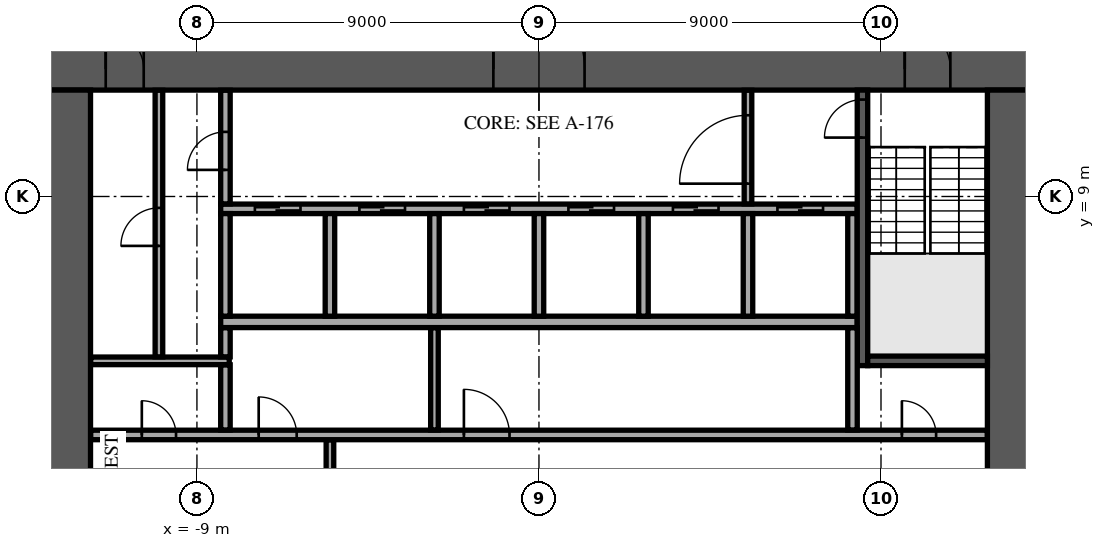
"""IFC4 building model, lengths in metres.
Left out: names, types, materials, properties, quantities, classifications, styles, units other than length and angle.
Written with IfcOpenShell. Run it as: python <this file> out.ifc"""

import sys

from ifc_helpers import new_model, si_unit, direction, frame, frame_2d, origin, place, context, subcontext, project, spatial, rectangle, extrude, element, fill, save


model = new_model("IFC4")
c1 = context("Model", 3, precision=1e-05, world=origin(), true_north=direction((0.0, 1.0)))
c2 = subcontext(c1, "Body", "Model", "MODEL_VIEW")
j1 = project(units=[si_unit("LENGTHUNIT", "METRE"), si_unit("PLANEANGLEUNIT", "RADIAN")], contexts=[c1])
p1 = place(None, origin())
s1 = spatial("IfcSite", under=j1, at=p1, CompositionType="ELEMENT")
p2 = place(p1, origin())
s2 = spatial("IfcBuilding", under=s1, at=p2, CompositionType="ELEMENT")
p3 = place(p2, frame((0.0, 0.0, 86.1)))
s3 = spatial("IfcBuildingStorey", under=s2, at=p3, CompositionType="ELEMENT", Elevation=86.1)
p4 = place(p3, frame((-12.9, 12.35, 0.0), z_axis=(0.0, 0.0, 1.0), x_axis=(1.0, 0.0, 0.0)))
e1 = element("IfcWall", 1, at=p4, inside=s3, PredefinedType="SHEAR", context=c2, shape_type="SweptSolid", body=[
    extrude(rectangle(XDim=25.8, YDim=1.1, at=frame_2d((12.9, 0.0))), origin(), (0.0, 0.0, 1.0), 3.58),
])
p5 = place(p4, frame((11.7, 0.0, 0.0)))
e2 = element("IfcOpeningElement", 2, at=p5, cuts=e1, PredefinedType="OPENING", context=c2, shape_type="SweptSolid", body=[
    extrude(rectangle(XDim=2.4, YDim=2.4, at=frame_2d((1.2, 1.2))), frame((0.0, 0.56, 0.0), z_axis=(0.0, -1.0, 0.0), x_axis=(1.0, 0.0, 0.0)), (0.0, 0.0, 1.0), 1.12),
])
p6 = place(p4, frame((22.525, 0.0, 0.0)))
e3 = element("IfcOpeningElement", 3, at=p6, cuts=e1, PredefinedType="OPENING", context=c2, shape_type="SweptSolid", body=[
    extrude(rectangle(XDim=1.2, YDim=2.1, at=frame_2d((0.6, 1.05))), frame((0.0, 0.56, 0.0), z_axis=(0.0, -1.0, 0.0), x_axis=(1.0, 0.0, 0.0)), (0.0, 0.0, 1.0), 1.12),
])
p7 = place(p4, frame((1.5, 0.0, 0.0)))
e4 = element("IfcOpeningElement", 4, at=p7, cuts=e1, PredefinedType="OPENING", context=c2, shape_type="SweptSolid", body=[
    extrude(rectangle(XDim=1.0, YDim=2.1, at=frame_2d((0.5, 1.05))), frame((0.0, 0.56, 0.0), z_axis=(0.0, -1.0, 0.0), x_axis=(1.0, 0.0, 0.0)), (0.0, 0.0, 1.0), 1.12),
])
p8 = place(p3, frame((12.35, -11.8, 0.0), z_axis=(0.0, 0.0, 1.0), x_axis=(0.0, 1.0, 0.0)))
e5 = element("IfcWall", 5, at=p8, inside=s3, PredefinedType="SHEAR", context=c2, shape_type="SweptSolid", body=[
    extrude(rectangle(XDim=23.6, YDim=1.1, at=frame_2d((11.8, 0.0))), origin(), (0.0, 0.0, 1.0), 3.58),
])
p9 = place(p8, frame((10.6, 0.0, 0.0)))
e6 = element("IfcOpeningElement", 6, at=p9, cuts=e5, PredefinedType="OPENING", context=c2, shape_type="SweptSolid", body=[
    extrude(rectangle(XDim=2.4, YDim=2.4, at=frame_2d((1.2, 1.2))), frame((0.0, 0.56, 0.0), z_axis=(0.0, -1.0, 0.0), x_axis=(1.0, 0.0, 0.0)), (0.0, 0.0, 1.0), 1.12),
])
p10 = place(p3, frame((-12.35, -11.8, 0.0), z_axis=(0.0, 0.0, 1.0), x_axis=(0.0, 1.0, 0.0)))
e7 = element("IfcWall", 7, at=p10, inside=s3, PredefinedType="SHEAR", context=c2, shape_type="SweptSolid", body=[
    extrude(rectangle(XDim=23.6, YDim=1.1, at=frame_2d((11.8, 0.0))), origin(), (0.0, 0.0, 1.0), 3.58),
])
p11 = place(p10, frame((10.6, 0.0, 0.0)))
e8 = element("IfcOpeningElement", 8, at=p11, cuts=e7, PredefinedType="OPENING", context=c2, shape_type="SweptSolid", body=[
    extrude(rectangle(XDim=2.4, YDim=2.4, at=frame_2d((1.2, 1.2))), frame((0.0, 0.56, 0.0), z_axis=(0.0, -1.0, 0.0), x_axis=(1.0, 0.0, 0.0)), (0.0, 0.0, 1.0), 1.12),
])
p12 = place(p3, frame((-8.375, 5.7, 0.0), z_axis=(0.0, 0.0, 1.0), x_axis=(1.0, 0.0, 0.0)))
e9 = element("IfcWall", 9, at=p12, inside=s3, PredefinedType="SOLIDWALL", context=c2, shape_type="SweptSolid", body=[
    extrude(rectangle(XDim=16.75, YDim=0.3, at=frame_2d((8.375, 0.0))), origin(), (0.0, 0.0, 1.0), 3.58),
])
p13 = place(p3, frame((-8.375, 8.675, 0.0), z_axis=(0.0, 0.0, 1.0), x_axis=(1.0, 0.0, 0.0)))
e10 = element("IfcWall", 10, at=p13, inside=s3, PredefinedType="SOLIDWALL", context=c2, shape_type="SweptSolid", body=[
    extrude(rectangle(XDim=16.75, YDim=0.25, at=frame_2d((8.375, 0.0))), origin(), (0.0, 0.0, 1.0), 3.58),
])
p14 = place(p13, frame((0.9, 0.0, 0.0)))
e11 = element("IfcOpeningElement", 11, at=p14, cuts=e10, PredefinedType="OPENING", context=c2, shape_type="SweptSolid", body=[
    extrude(rectangle(XDim=1.2, YDim=2.1, at=frame_2d((0.6, 1.05))), frame((0.0, 0.135, 0.0), z_axis=(0.0, -1.0, 0.0), x_axis=(1.0, 0.0, 0.0)), (0.0, 0.0, 1.0), 0.27),
])
p15 = place(p13, frame((3.65, 0.0, 0.0)))
e12 = element("IfcOpeningElement", 12, at=p15, cuts=e10, PredefinedType="OPENING", context=c2, shape_type="SweptSolid", body=[
    extrude(rectangle(XDim=1.2, YDim=2.1, at=frame_2d((0.6, 1.05))), frame((0.0, 0.135, 0.0), z_axis=(0.0, -1.0, 0.0), x_axis=(1.0, 0.0, 0.0)), (0.0, 0.0, 1.0), 0.27),
])
p16 = place(p13, frame((6.4, 0.0, 0.0)))
e13 = element("IfcOpeningElement", 13, at=p16, cuts=e10, PredefinedType="OPENING", context=c2, shape_type="SweptSolid", body=[
    extrude(rectangle(XDim=1.2, YDim=2.1, at=frame_2d((0.6, 1.05))), frame((0.0, 0.135, 0.0), z_axis=(0.0, -1.0, 0.0), x_axis=(1.0, 0.0, 0.0)), (0.0, 0.0, 1.0), 0.27),
])
p17 = place(p13, frame((9.15, 0.0, 0.0)))
e14 = element("IfcOpeningElement", 14, at=p17, cuts=e10, PredefinedType="OPENING", context=c2, shape_type="SweptSolid", body=[
    extrude(rectangle(XDim=1.2, YDim=2.1, at=frame_2d((0.6, 1.05))), frame((0.0, 0.135, 0.0), z_axis=(0.0, -1.0, 0.0), x_axis=(1.0, 0.0, 0.0)), (0.0, 0.0, 1.0), 0.27),
])
p18 = place(p13, frame((11.9, 0.0, 0.0)))
e15 = element("IfcOpeningElement", 15, at=p18, cuts=e10, PredefinedType="OPENING", context=c2, shape_type="SweptSolid", body=[
    extrude(rectangle(XDim=1.2, YDim=2.1, at=frame_2d((0.6, 1.05))), frame((0.0, 0.135, 0.0), z_axis=(0.0, -1.0, 0.0), x_axis=(1.0, 0.0, 0.0)), (0.0, 0.0, 1.0), 0.27),
])
p19 = place(p13, frame((14.65, 0.0, 0.0)))
e16 = element("IfcOpeningElement", 16, at=p19, cuts=e10, PredefinedType="OPENING", context=c2, shape_type="SweptSolid", body=[
    extrude(rectangle(XDim=1.2, YDim=2.1, at=frame_2d((0.6, 1.05))), frame((0.0, 0.135, 0.0), z_axis=(0.0, -1.0, 0.0), x_axis=(1.0, 0.0, 0.0)), (0.0, 0.0, 1.0), 0.27),
])
for number, where, z_axis, x_axis in (
    (17, (-8.25, 5.85, 0.0), (0.0, 0.0, 1.0), (0.0, 1.0, 0.0)),
    (18, (-5.5, 5.85, 0.0), (0.0, 0.0, 1.0), (0.0, 1.0, 0.0)),
    (19, (-2.75, 5.85, 0.0), (0.0, 0.0, 1.0), (0.0, 1.0, 0.0)),
    (20, (0.0, 5.85, 0.0), (0.0, 0.0, 1.0), (0.0, 1.0, 0.0)),
    (21, (2.75, 5.85, 0.0), (0.0, 0.0, 1.0), (0.0, 1.0, 0.0)),
    (22, (5.5, 5.85, 0.0), (0.0, 0.0, 1.0), (0.0, 1.0, 0.0)),
    (23, (8.25, 5.85, 0.0), (0.0, 0.0, 1.0), (0.0, 1.0, 0.0)),
):
    element("IfcWall", number, at=place(p3, frame(where, z_axis=z_axis, x_axis=x_axis)), inside=s3, PredefinedType="SOLIDWALL", context=c2, shape_type="SweptSolid", body=[
        extrude(rectangle(XDim=2.7, YDim=0.25, at=frame_2d((1.35, 0.0))), origin(), (0.0, 0.0, 1.0), 3.58),
    ])
p20 = place(p3, frame((8.512, 4.55, 0.0), z_axis=(0.0, 0.0, 1.0), x_axis=(0.0, 1.0, 0.0)))
e24 = element("IfcWall", 24, at=p20, inside=s3, PredefinedType="SOLIDWALL", context=c2, shape_type="SweptSolid", body=[
    extrude(rectangle(XDim=7.25, YDim=0.275, at=frame_2d((3.625, 0.0))), origin(), (0.0, 0.0, 1.0), 3.58),
])
p21 = place(p20, frame((6.0, 0.0, 0.0)))
e25 = element("IfcOpeningElement", 25, at=p21, cuts=e24, PredefinedType="OPENING", context=c2, shape_type="SweptSolid", body=[
    extrude(rectangle(XDim=1.0, YDim=2.1, at=frame_2d((0.5, 1.05))), frame((0.0, 0.147, 0.0), z_axis=(0.0, -1.0, 0.0), x_axis=(1.0, 0.0, 0.0)), (0.0, 0.0, 1.0), 0.295),
])
p22 = place(p3, frame((8.65, 4.675, 0.0), z_axis=(0.0, 0.0, 1.0), x_axis=(1.0, 0.0, 0.0)))
e26 = element("IfcWall", 26, at=p22, inside=s3, PredefinedType="SOLIDWALL", context=c2, shape_type="SweptSolid", body=[
    extrude(rectangle(XDim=3.15, YDim=0.25, at=frame_2d((1.575, 0.0))), origin(), (0.0, 0.0, 1.0), 3.58),
])
p23 = place(p3, frame((-5.5, -2.595, 0.0), z_axis=(0.0, 0.0, 1.0), x_axis=(0.0, 1.0, 0.0)))
e27 = element("IfcWall", 27, at=p23, inside=s3, PredefinedType="PARTITIONING", context=c2, shape_type="SweptSolid", body=[
    extrude(rectangle(XDim=5.19, YDim=0.2, at=frame_2d((2.595, 0.0))), origin(), (0.0, 0.0, 1.0), 3.58),
])
p24 = place(p23, frame((1.395, 0.0, 0.0)))
e28 = element("IfcOpeningElement", 28, at=p24, cuts=e27, PredefinedType="OPENING", context=c2, shape_type="SweptSolid", body=[
    extrude(rectangle(XDim=2.4, YDim=2.4, at=frame_2d((1.2, 1.2))), frame((0.0, 0.11, 0.0), z_axis=(0.0, -1.0, 0.0), x_axis=(1.0, 0.0, 0.0)), (0.0, 0.0, 1.0), 0.22),
])
p25 = place(p3, frame((-11.795, 2.725, 0.0), z_axis=(0.0, 0.0, 1.0), x_axis=(1.0, 0.0, 0.0)))
e29 = element("IfcWall", 29, at=p25, inside=s3, PredefinedType="PARTITIONING", context=c2, shape_type="SweptSolid", body=[
    extrude(rectangle(XDim=23.59, YDim=0.25, at=frame_2d((11.795, 0.0))), origin(), (0.0, 0.0, 1.0), 3.58),
])
p26 = place(p25, frame((21.345, 0.0, 0.0)))
e30 = element("IfcOpeningElement", 30, at=p26, cuts=e29, PredefinedType="OPENING", context=c2, shape_type="SweptSolid", body=[
    extrude(rectangle(XDim=0.9, YDim=2.1, at=frame_2d((0.45, 1.05))), frame((0.0, 0.135, 0.0), z_axis=(0.0, -1.0, 0.0), x_axis=(1.0, 0.0, 0.0)), (0.0, 0.0, 1.0), 0.27),
])
p27 = place(p25, frame((1.345, 0.0, 0.0)))
e31 = element("IfcOpeningElement", 31, at=p27, cuts=e29, PredefinedType="OPENING", context=c2, shape_type="SweptSolid", body=[
    extrude(rectangle(XDim=0.9, YDim=2.1, at=frame_2d((0.45, 1.05))), frame((0.0, 0.135, 0.0), z_axis=(0.0, -1.0, 0.0), x_axis=(1.0, 0.0, 0.0)), (0.0, 0.0, 1.0), 0.27),
])
p28 = place(p25, frame((4.42, 0.0, 0.0)))
e32 = element("IfcOpeningElement", 32, at=p28, cuts=e29, PredefinedType="OPENING", context=c2, shape_type="SweptSolid", body=[
    extrude(rectangle(XDim=1.0, YDim=2.1, at=frame_2d((0.5, 1.05))), frame((0.0, 0.135, 0.0), z_axis=(0.0, -1.0, 0.0), x_axis=(1.0, 0.0, 0.0)), (0.0, 0.0, 1.0), 0.27),
])
p29 = place(p25, frame((9.82, 0.0, 0.0)))
e33 = element("IfcOpeningElement", 33, at=p29, cuts=e29, PredefinedType="OPENING", context=c2, shape_type="SweptSolid", body=[
    extrude(rectangle(XDim=1.2, YDim=2.1, at=frame_2d((0.6, 1.05))), frame((0.0, 0.135, 0.0), z_axis=(0.0, -1.0, 0.0), x_axis=(1.0, 0.0, 0.0)), (0.0, 0.0, 1.0), 0.27),
])
p30 = place(p3, frame((-8.25, 2.855, 0.0), z_axis=(0.0, 0.0, 1.0), x_axis=(0.0, 1.0, 0.0)))
e34 = element("IfcWall", 34, at=p30, inside=s3, PredefinedType="PARTITIONING", context=c2, shape_type="SweptSolid", body=[
    extrude(rectangle(XDim=1.715, YDim=0.25, at=frame_2d((0.857, 0.0))), origin(), (0.0, 0.0, 1.0), 3.58),
])
p31 = place(p3, frame((-2.75, 2.855, 0.0), z_axis=(0.0, 0.0, 1.0), x_axis=(0.0, 1.0, 0.0)))
e35 = element("IfcWall", 35, at=p31, inside=s3, PredefinedType="PARTITIONING", context=c2, shape_type="SweptSolid", body=[
    extrude(rectangle(XDim=2.69, YDim=0.2, at=frame_2d((1.345, 0.0))), origin(), (0.0, 0.0, 1.0), 3.58),
])
p32 = place(p3, frame((8.25, 2.855, 0.0), z_axis=(0.0, 0.0, 1.0), x_axis=(0.0, 1.0, 0.0)))
e36 = element("IfcWall", 36, at=p32, inside=s3, PredefinedType="PARTITIONING", context=c2, shape_type="SweptSolid", body=[
    extrude(rectangle(XDim=2.69, YDim=0.25, at=frame_2d((1.345, 0.0))), origin(), (0.0, 0.0, 1.0), 3.58),
])
p33 = place(p3, frame((-11.795, 4.675, 0.0), z_axis=(0.0, 0.0, 1.0), x_axis=(1.0, 0.0, 0.0)))
e37 = element("IfcWall", 37, at=p33, inside=s3, PredefinedType="PARTITIONING", context=c2, shape_type="SweptSolid", body=[
    extrude(rectangle(XDim=3.645, YDim=0.2, at=frame_2d((1.823, 0.0))), origin(), (0.0, 0.0, 1.0), 3.58),
])
p34 = place(p3, frame((-10.0, 4.78, 0.0), z_axis=(0.0, 0.0, 1.0), x_axis=(0.0, 1.0, 0.0)))
e38 = element("IfcWall", 38, at=p34, inside=s3, PredefinedType="PARTITIONING", context=c2, shape_type="SweptSolid", body=[
    extrude(rectangle(XDim=7.015, YDim=0.2, at=frame_2d((3.507, 0.0))), origin(), (0.0, 0.0, 1.0), 3.58),
])
p35 = place(p34, frame((2.92, 0.0, 0.0)))
e39 = element("IfcOpeningElement", 39, at=p35, cuts=e38, PredefinedType="OPENING", context=c2, shape_type="SweptSolid", body=[
    extrude(rectangle(XDim=1.0, YDim=2.1, at=frame_2d((0.5, 1.05))), frame((0.0, 0.11, 0.0), z_axis=(0.0, -1.0, 0.0), x_axis=(1.0, 0.0, 0.0)), (0.0, 0.0, 1.0), 0.22),
])
p36 = place(p3, frame((-8.25, 4.78, 0.0), z_axis=(0.0, 0.0, 1.0), x_axis=(0.0, 1.0, 0.0)))
e40 = element("IfcWall", 40, at=p36, inside=s3, PredefinedType="PARTITIONING", context=c2, shape_type="SweptSolid", body=[
    extrude(rectangle(XDim=0.765, YDim=0.25, at=frame_2d((0.382, 0.0))), origin(), (0.0, 0.0, 1.0), 3.58),
])
p37 = place(p3, frame((-8.25, 8.805, 0.0), z_axis=(0.0, 0.0, 1.0), x_axis=(0.0, 1.0, 0.0)))
e41 = element("IfcWall", 41, at=p37, inside=s3, PredefinedType="PARTITIONING", context=c2, shape_type="SweptSolid", body=[
    extrude(rectangle(XDim=2.99, YDim=0.25, at=frame_2d((1.495, 0.0))), origin(), (0.0, 0.0, 1.0), 3.58),
])
p38 = place(p37, frame((0.895, 0.0, 0.0)))
e42 = element("IfcOpeningElement", 42, at=p38, cuts=e41, PredefinedType="OPENING", context=c2, shape_type="SweptSolid", body=[
    extrude(rectangle(XDim=1.0, YDim=2.1, at=frame_2d((0.5, 1.05))), frame((0.0, 0.135, 0.0), z_axis=(0.0, -1.0, 0.0), x_axis=(1.0, 0.0, 0.0)), (0.0, 0.0, 1.0), 0.27),
])
p39 = place(p3, frame((5.5, 8.805, 0.0), z_axis=(0.0, 0.0, 1.0), x_axis=(0.0, 1.0, 0.0)))
e43 = element("IfcWall", 43, at=p39, inside=s3, PredefinedType="PARTITIONING", context=c2, shape_type="SweptSolid", body=[
    extrude(rectangle(XDim=2.99, YDim=0.2, at=frame_2d((1.495, 0.0))), origin(), (0.0, 0.0, 1.0), 3.58),
])
p40 = place(p39, frame((0.532, 0.0, 0.0)))
e44 = element("IfcOpeningElement", 44, at=p40, cuts=e43, PredefinedType="OPENING", context=c2, shape_type="SweptSolid", body=[
    extrude(rectangle(XDim=1.8, YDim=2.1, at=frame_2d((0.9, 1.05))), frame((0.0, 0.11, 0.0), z_axis=(0.0, -1.0, 0.0), x_axis=(1.0, 0.0, 0.0)), (0.0, 0.0, 1.0), 0.22),
])
p41 = place(p5, origin())
e45 = element("IfcDoor", 45, at=p41, inside=s3, OperationType="SINGLE_SWING_LEFT", PredefinedType="DOOR", context=c2, shape_type="SweptSolid", body=[
    extrude(rectangle(XDim=2.4, YDim=2.4, at=frame_2d((1.2, 1.2))), frame((0.0, 0.025, 0.0), z_axis=(0.0, -1.0, 0.0), x_axis=(1.0, 0.0, 0.0)), (0.0, 0.0, 1.0), 0.05),
])
fill(e2, e45)
p42 = place(p6, origin())
e46 = element("IfcDoor", 46, at=p42, inside=s3, OperationType="SINGLE_SWING_LEFT", PredefinedType="DOOR", context=c2, shape_type="SweptSolid", body=[
    extrude(rectangle(XDim=1.2, YDim=2.1, at=frame_2d((0.6, 1.05))), frame((0.0, 0.025, 0.0), z_axis=(0.0, -1.0, 0.0), x_axis=(1.0, 0.0, 0.0)), (0.0, 0.0, 1.0), 0.05),
])
fill(e3, e46)
p43 = place(p7, origin())
e47 = element("IfcDoor", 47, at=p43, inside=s3, OperationType="SINGLE_SWING_LEFT", PredefinedType="DOOR", context=c2, shape_type="SweptSolid", body=[
    extrude(rectangle(XDim=1.0, YDim=2.1, at=frame_2d((0.5, 1.05))), frame((0.0, 0.025, 0.0), z_axis=(0.0, -1.0, 0.0), x_axis=(1.0, 0.0, 0.0)), (0.0, 0.0, 1.0), 0.05),
])
fill(e4, e47)
p44 = place(p14, origin())
e48 = element("IfcDoor", 48, at=p44, inside=s3, OperationType="DOUBLE_DOOR_SLIDING", PredefinedType="DOOR", context=c2, shape_type="SweptSolid", body=[
    extrude(rectangle(XDim=1.2, YDim=2.1, at=frame_2d((0.6, 1.05))), frame((0.0, 0.025, 0.0), z_axis=(0.0, -1.0, 0.0), x_axis=(1.0, 0.0, 0.0)), (0.0, 0.0, 1.0), 0.05),
])
fill(e11, e48)
p45 = place(p15, origin())
e49 = element("IfcDoor", 49, at=p45, inside=s3, OperationType="DOUBLE_DOOR_SLIDING", PredefinedType="DOOR", context=c2, shape_type="SweptSolid", body=[
    extrude(rectangle(XDim=1.2, YDim=2.1, at=frame_2d((0.6, 1.05))), frame((0.0, 0.025, 0.0), z_axis=(0.0, -1.0, 0.0), x_axis=(1.0, 0.0, 0.0)), (0.0, 0.0, 1.0), 0.05),
])
fill(e12, e49)
p46 = place(p16, origin())
e50 = element("IfcDoor", 50, at=p46, inside=s3, OperationType="DOUBLE_DOOR_SLIDING", PredefinedType="DOOR", context=c2, shape_type="SweptSolid", body=[
    extrude(rectangle(XDim=1.2, YDim=2.1, at=frame_2d((0.6, 1.05))), frame((0.0, 0.025, 0.0), z_axis=(0.0, -1.0, 0.0), x_axis=(1.0, 0.0, 0.0)), (0.0, 0.0, 1.0), 0.05),
])
fill(e13, e50)
p47 = place(p17, origin())
e51 = element("IfcDoor", 51, at=p47, inside=s3, OperationType="DOUBLE_DOOR_SLIDING", PredefinedType="DOOR", context=c2, shape_type="SweptSolid", body=[
    extrude(rectangle(XDim=1.2, YDim=2.1, at=frame_2d((0.6, 1.05))), frame((0.0, 0.025, 0.0), z_axis=(0.0, -1.0, 0.0), x_axis=(1.0, 0.0, 0.0)), (0.0, 0.0, 1.0), 0.05),
])
fill(e14, e51)
p48 = place(p18, origin())
e52 = element("IfcDoor", 52, at=p48, inside=s3, OperationType="DOUBLE_DOOR_SLIDING", PredefinedType="DOOR", context=c2, shape_type="SweptSolid", body=[
    extrude(rectangle(XDim=1.2, YDim=2.1, at=frame_2d((0.6, 1.05))), frame((0.0, 0.025, 0.0), z_axis=(0.0, -1.0, 0.0), x_axis=(1.0, 0.0, 0.0)), (0.0, 0.0, 1.0), 0.05),
])
fill(e15, e52)
p49 = place(p19, origin())
e53 = element("IfcDoor", 53, at=p49, inside=s3, OperationType="DOUBLE_DOOR_SLIDING", PredefinedType="DOOR", context=c2, shape_type="SweptSolid", body=[
    extrude(rectangle(XDim=1.2, YDim=2.1, at=frame_2d((0.6, 1.05))), frame((0.0, 0.025, 0.0), z_axis=(0.0, -1.0, 0.0), x_axis=(1.0, 0.0, 0.0)), (0.0, 0.0, 1.0), 0.05),
])
fill(e16, e53)
p50 = place(p21, origin())
e54 = element("IfcDoor", 54, at=p50, inside=s3, OperationType="SINGLE_SWING_LEFT", PredefinedType="DOOR", context=c2, shape_type="SweptSolid", body=[
    extrude(rectangle(XDim=1.0, YDim=2.1, at=frame_2d((0.5, 1.05))), frame((0.0, 0.025, 0.0), z_axis=(0.0, -1.0, 0.0), x_axis=(1.0, 0.0, 0.0)), (0.0, 0.0, 1.0), 0.05),
])
fill(e25, e54)
p51 = place(p26, origin())
e55 = element("IfcDoor", 55, at=p51, inside=s3, OperationType="SINGLE_SWING_RIGHT", PredefinedType="DOOR", context=c2, shape_type="SweptSolid", body=[
    extrude(rectangle(XDim=0.9, YDim=2.1, at=frame_2d((0.45, 1.05))), frame((0.0, 0.025, 0.0), z_axis=(0.0, -1.0, 0.0), x_axis=(1.0, 0.0, 0.0)), (0.0, 0.0, 1.0), 0.05),
])
fill(e30, e55)
p52 = place(p27, origin())
e56 = element("IfcDoor", 56, at=p52, inside=s3, OperationType="SINGLE_SWING_RIGHT", PredefinedType="DOOR", context=c2, shape_type="SweptSolid", body=[
    extrude(rectangle(XDim=0.9, YDim=2.1, at=frame_2d((0.45, 1.05))), frame((0.0, 0.025, 0.0), z_axis=(0.0, -1.0, 0.0), x_axis=(1.0, 0.0, 0.0)), (0.0, 0.0, 1.0), 0.05),
])
fill(e31, e56)
p53 = place(p35, origin())
e57 = element("IfcDoor", 57, at=p53, inside=s3, OperationType="SINGLE_SWING_RIGHT", PredefinedType="DOOR", context=c2, shape_type="SweptSolid", body=[
    extrude(rectangle(XDim=1.0, YDim=2.1, at=frame_2d((0.5, 1.05))), frame((0.0, 0.025, 0.0), z_axis=(0.0, -1.0, 0.0), x_axis=(1.0, 0.0, 0.0)), (0.0, 0.0, 1.0), 0.05),
])
fill(e39, e57)
p54 = place(p38, origin())
e58 = element("IfcDoor", 58, at=p54, inside=s3, OperationType="SINGLE_SWING_RIGHT", PredefinedType="DOOR", context=c2, shape_type="SweptSolid", body=[
    extrude(rectangle(XDim=1.0, YDim=2.1, at=frame_2d((0.5, 1.05))), frame((0.0, 0.025, 0.0), z_axis=(0.0, -1.0, 0.0), x_axis=(1.0, 0.0, 0.0)), (0.0, 0.0, 1.0), 0.05),
])
fill(e42, e58)
p55 = place(p28, origin())
e59 = element("IfcDoor", 59, at=p55, inside=s3, OperationType="SINGLE_SWING_RIGHT", PredefinedType="DOOR", context=c2, shape_type="SweptSolid", body=[
    extrude(rectangle(XDim=1.0, YDim=2.1, at=frame_2d((0.5, 1.05))), frame((0.0, 0.025, 0.0), z_axis=(0.0, -1.0, 0.0), x_axis=(1.0, 0.0, 0.0)), (0.0, 0.0, 1.0), 0.05),
])
fill(e32, e59)
p56 = place(p29, origin())
e60 = element("IfcDoor", 60, at=p56, inside=s3, OperationType="SINGLE_SWING_LEFT", PredefinedType="DOOR", context=c2, shape_type="SweptSolid", body=[
    extrude(rectangle(XDim=1.2, YDim=2.1, at=frame_2d((0.6, 1.05))), frame((0.0, 0.025, 0.0), z_axis=(0.0, -1.0, 0.0), x_axis=(1.0, 0.0, 0.0)), (0.0, 0.0, 1.0), 0.05),
])
fill(e33, e60)
p57 = place(p40, origin())
e61 = element("IfcDoor", 61, at=p57, inside=s3, OperationType="SINGLE_SWING_LEFT", PredefinedType="DOOR", context=c2, shape_type="SweptSolid", body=[
    extrude(rectangle(XDim=1.8, YDim=2.1, at=frame_2d((0.9, 1.05))), frame((0.0, 0.025, 0.0), z_axis=(0.0, -1.0, 0.0), x_axis=(1.0, 0.0, 0.0)), (0.0, 0.0, 1.0), 0.05),
])
fill(e44, e61)
save(model, sys.argv[1])
